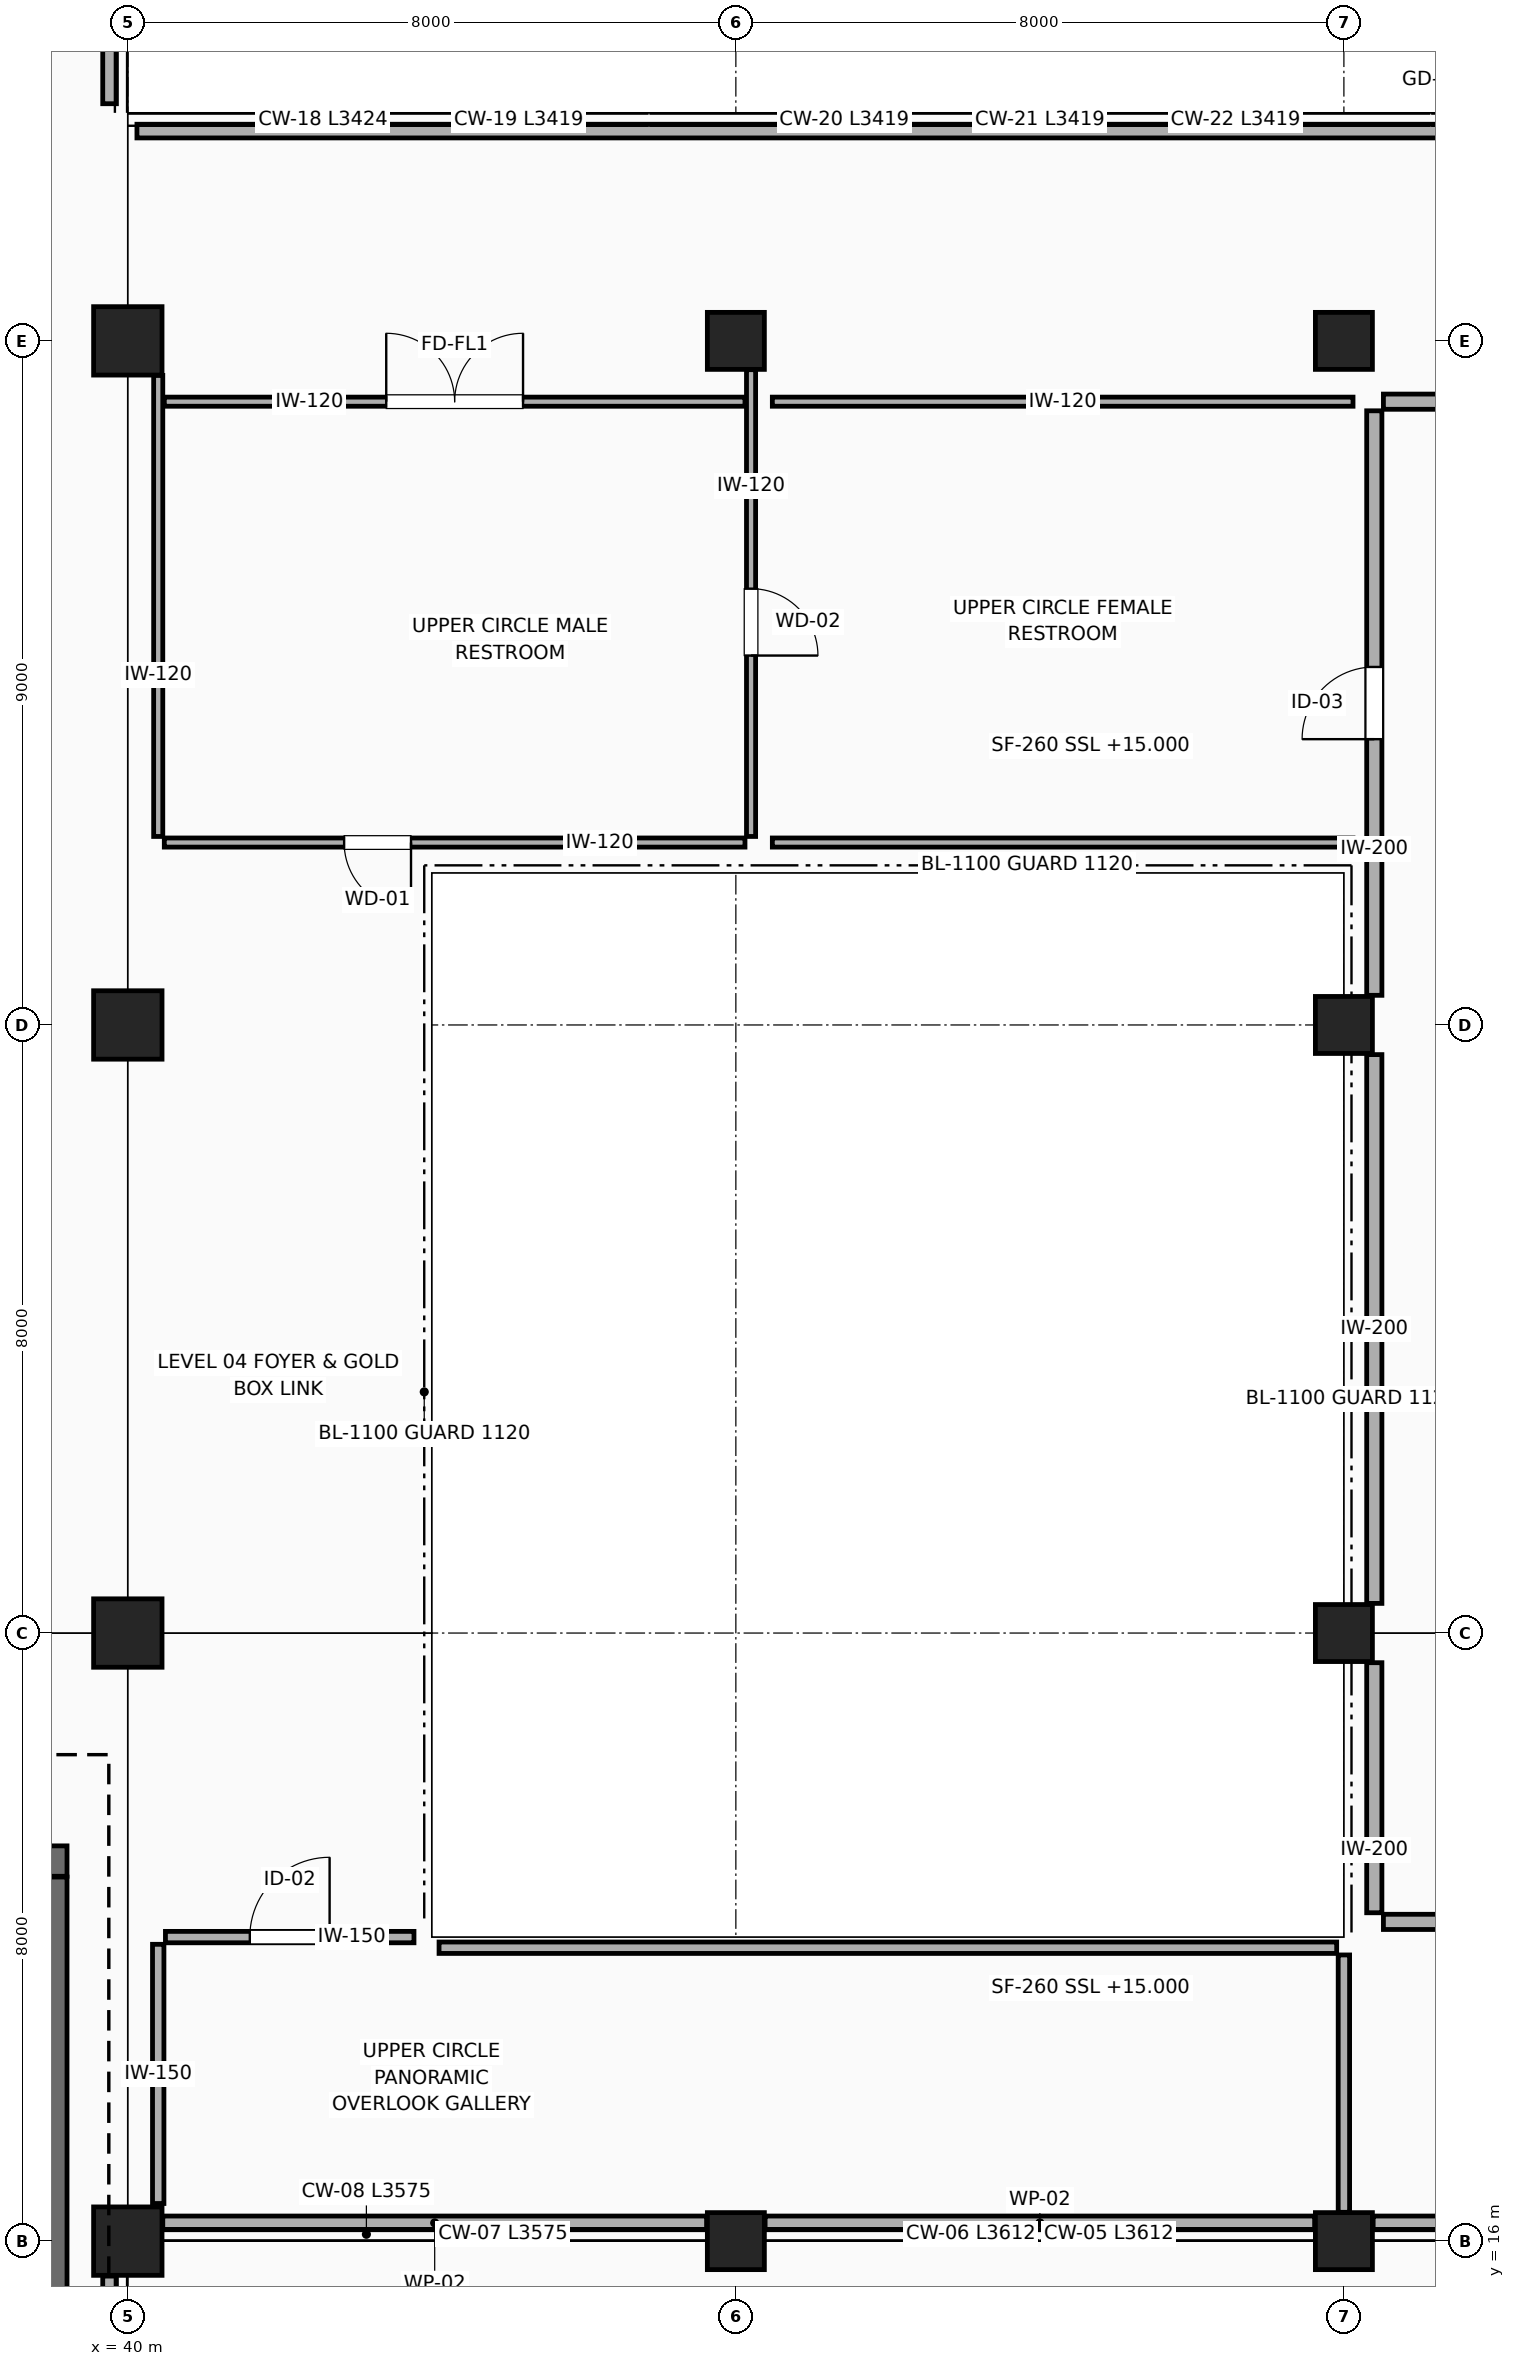
"""IFC4 building model, lengths in metres.
Left out: names, types, materials, properties, quantities, classifications, styles, units other than length and angle.
Written with IfcOpenShell. Run it as: python <this file> out.ifc"""

import sys

from ifc_helpers import new_model, si_unit, direction, frame, frame_2d, origin, origin_2d, place, context, subcontext, project, spatial, rectangle, extrude, element, fill, save


model = new_model("IFC4")
c1 = context("Model", 3, precision=1e-05, world=origin(), true_north=direction((0.0, 1.0)))
c2 = subcontext(c1, "Body", "Model", "MODEL_VIEW")
j1 = project(units=[si_unit("LENGTHUNIT", "METRE"), si_unit("PLANEANGLEUNIT", "RADIAN")], contexts=[c1])
p1 = place(None, origin())
s1 = spatial("IfcSite", under=j1, at=p1, CompositionType="ELEMENT")
p2 = place(p1, origin())
s2 = spatial("IfcBuilding", under=s1, at=p2, CompositionType="ELEMENT")
p3 = place(p2, frame((0.0, 0.0, 15.0)))
s3 = spatial("IfcBuildingStorey", under=s2, at=p3, CompositionType="ELEMENT", Elevation=15.0)
for number, where, z_axis, x_axis in (
    (1, (40.0, 16.0, 0.0), (0.0, 0.0, 1.0), (1.0, 0.0, 0.0)),
    (2, (40.0, 24.0, 0.0), (0.0, 0.0, 1.0), (1.0, 0.0, 0.0)),
    (3, (40.0, 32.0, 0.0), (0.0, 0.0, 1.0), (1.0, 0.0, 0.0)),
    (4, (40.0, 41.0, 0.0), (0.0, 0.0, 1.0), (1.0, 0.0, 0.0)),
):
    element("IfcColumn", number, at=place(p3, frame(where, z_axis=z_axis, x_axis=x_axis)), inside=s3, PredefinedType="COLUMN", context=c2, shape_type="SweptSolid", body=[
        extrude(rectangle(XDim=0.9, YDim=0.9, at=origin_2d()), origin(), (0.0, 0.0, 1.0), 4.8),
    ])
for number, where, z_axis, x_axis in (
    (5, (48.0, 16.0, 0.0), (0.0, 0.0, 1.0), (1.0, 0.0, 0.0)),
    (6, (48.0, 41.0, 0.0), (0.0, 0.0, 1.0), (1.0, 0.0, 0.0)),
    (7, (56.0, 16.0, 0.0), (0.0, 0.0, 1.0), (1.0, 0.0, 0.0)),
    (8, (56.0, 24.0, 0.0), (0.0, 0.0, 1.0), (1.0, 0.0, 0.0)),
    (9, (56.0, 32.0, 0.0), (0.0, 0.0, 1.0), (1.0, 0.0, 0.0)),
    (10, (56.0, 41.0, 0.0), (0.0, 0.0, 1.0), (1.0, 0.0, 0.0)),
):
    element("IfcColumn", number, at=place(p3, frame(where, z_axis=z_axis, x_axis=x_axis)), inside=s3, PredefinedType="COLUMN", context=c2, shape_type="SweptSolid", body=[
        extrude(rectangle(XDim=0.75, YDim=0.75, at=origin_2d()), origin(), (0.0, 0.0, 1.0), 4.76),
    ])
p4 = place(p3, frame((63.88, 16.24, 0.0), z_axis=(0.0, 0.0, 1.0), x_axis=(-1.0, 0.0, 0.0)))
e11 = element("IfcWall", 11, at=p4, inside=s3, PredefinedType="PARAPET", context=c2, shape_type="SweptSolid", body=[
    extrude(rectangle(XDim=7.495, YDim=0.18, at=frame_2d((3.748, 0.0))), origin(), (0.0, 0.0, 1.0), 0.88),
])
p5 = place(p3, frame((55.615, 16.24, 0.0), z_axis=(0.0, 0.0, 1.0), x_axis=(-1.0, 0.0, 0.0)))
e12 = element("IfcWall", 12, at=p5, inside=s3, PredefinedType="PARAPET", context=c2, shape_type="SweptSolid", body=[
    extrude(rectangle(XDim=7.23, YDim=0.18, at=frame_2d((3.615, 0.0))), origin(), (0.0, 0.0, 1.0), 0.88),
])
p6 = place(p3, frame((47.615, 16.24, 0.0), z_axis=(0.0, 0.0, 1.0), x_axis=(-1.0, 0.0, 0.0)))
e13 = element("IfcWall", 13, at=p6, inside=s3, PredefinedType="PARAPET", context=c2, shape_type="SweptSolid", body=[
    extrude(rectangle(XDim=7.155, YDim=0.18, at=frame_2d((3.578, 0.0))), origin(), (0.0, 0.0, 1.0), 0.88),
])
p7 = place(p3, frame((39.76, 15.54, 0.0), z_axis=(0.0, 0.0, 1.0), x_axis=(0.0, -1.0, 0.0)))
e14 = element("IfcWall", 14, at=p7, inside=s3, PredefinedType="PARAPET", context=c2, shape_type="SweptSolid", body=[
    extrude(rectangle(XDim=7.08, YDim=0.18, at=frame_2d((3.54, 0.0))), origin(), (0.0, 0.0, 1.0), 0.88),
])
p8 = place(p3, frame((39.76, 49.54, 0.0), z_axis=(0.0, 0.0, 1.0), x_axis=(0.0, -1.0, 0.0)))
e15 = element("IfcWall", 15, at=p8, inside=s3, PredefinedType="PARAPET", context=c2, shape_type="SweptSolid", body=[
    extrude(rectangle(XDim=5.42, YDim=0.18, at=frame_2d((2.71, 0.0))), origin(), (0.0, 0.0, 1.0), 0.88),
])
p9 = place(p3, frame((40.12, 43.76, 0.0), z_axis=(0.0, 0.0, 1.0), x_axis=(1.0, 0.0, 0.0)))
e16 = element("IfcWall", 16, at=p9, inside=s3, PredefinedType="PARAPET", context=c2, shape_type="SweptSolid", body=[
    extrude(rectangle(XDim=23.76, YDim=0.18, at=frame_2d((11.88, 0.0))), origin(), (0.0, 0.0, 1.0), 0.88),
])
p10 = place(p3, frame((39.2, 21.0, 0.0), z_axis=(0.0, 0.0, 1.0), x_axis=(-1.0, 0.0, 0.0)))
e17 = element("IfcWall", 17, at=p10, inside=s3, PredefinedType="SHEAR", context=c2, shape_type="SweptSolid", body=[
    extrude(rectangle(XDim=8.4, YDim=0.4, at=frame_2d((4.2, 0.0))), origin(), (0.0, 0.0, 1.0), 4.55),
])
p11 = place(p3, frame((39.0, 12.41, 0.0), z_axis=(0.0, 0.0, 1.0), x_axis=(0.0, 1.0, 0.0)))
e18 = element("IfcWall", 18, at=p11, inside=s3, PredefinedType="SHEAR", context=c2, shape_type="SweptSolid", body=[
    extrude(rectangle(XDim=8.38, YDim=0.4, at=frame_2d((4.19, 0.0))), origin(), (0.0, 0.0, 1.0), 4.55),
])
p12 = place(p3, frame((40.4, 16.495, 0.0), z_axis=(0.0, 0.0, 1.0), x_axis=(0.0, 1.0, 0.0)))
e19 = element("IfcWall", 19, at=p12, inside=s3, PredefinedType="PARTITIONING", context=c2, shape_type="SweptSolid", body=[
    extrude(rectangle(XDim=3.41, YDim=0.15, at=frame_2d((1.705, 0.0))), origin(), (0.0, 0.0, 1.0), 3.68),
])
p13 = place(p3, frame((40.495, 20.0, 0.0), z_axis=(0.0, 0.0, 1.0), x_axis=(1.0, 0.0, 0.0)))
e20 = element("IfcWall", 20, at=p13, inside=s3, PredefinedType="PARTITIONING", context=c2, shape_type="SweptSolid", body=[
    extrude(rectangle(XDim=3.27, YDim=0.15, at=frame_2d((1.635, 0.0))), origin(), (0.0, 0.0, 1.0), 4.57),
])
p14 = place(p13, frame((1.11, 0.0, 0.0)))
e21 = element("IfcOpeningElement", 21, at=p14, cuts=e20, PredefinedType="OPENING", context=c2, shape_type="SweptSolid", body=[
    extrude(rectangle(XDim=1.05, YDim=2.15, at=frame_2d((0.525, 1.075))), frame((0.0, 0.085, 0.0), z_axis=(0.0, -1.0, 0.0), x_axis=(1.0, 0.0, 0.0)), (0.0, 0.0, 1.0), 0.17),
])
p15 = place(p3, frame((44.095, 19.86, 0.0), z_axis=(0.0, 0.0, 1.0), x_axis=(1.0, 0.0, 0.0)))
e22 = element("IfcWall", 22, at=p15, inside=s3, PredefinedType="PARTITIONING", context=c2, shape_type="SweptSolid", body=[
    extrude(rectangle(XDim=11.81, YDim=0.15, at=frame_2d((5.905, 0.0))), origin(), (0.0, 0.0, 1.0), 4.57),
])
p16 = place(p3, frame((56.0, 19.765, 0.0), z_axis=(0.0, 0.0, 1.0), x_axis=(0.0, -1.0, 0.0)))
e23 = element("IfcWall", 23, at=p16, inside=s3, PredefinedType="PARTITIONING", context=c2, shape_type="SweptSolid", body=[
    extrude(rectangle(XDim=3.386, YDim=0.15, at=frame_2d((1.693, 0.0))), origin(), (0.0, 0.0, 1.0), 4.18),
])
p17 = place(p3, frame((56.52, 40.2, 0.0), z_axis=(0.0, 0.0, 1.0), x_axis=(1.0, 0.0, 0.0)))
e24 = element("IfcWall", 24, at=p17, inside=s3, PredefinedType="PARTITIONING", context=c2, shape_type="SweptSolid", body=[
    extrude(rectangle(XDim=1.81, YDim=0.2, at=frame_2d((0.905, 0.0))), origin(), (0.0, 0.0, 1.0), 4.57),
])
p18 = place(p3, frame((63.68, 20.2, 0.0), z_axis=(0.0, 0.0, 1.0), x_axis=(-1.0, 0.0, 0.0)))
e25 = element("IfcWall", 25, at=p18, inside=s3, PredefinedType="PARTITIONING", context=c2, shape_type="SweptSolid", body=[
    extrude(rectangle(XDim=7.16, YDim=0.2, at=frame_2d((3.58, 0.0))), origin(), (0.0, 0.0, 1.0), 4.57),
])
p19 = place(p3, frame((56.4, 20.32, 0.0), z_axis=(0.0, 0.0, 1.0), x_axis=(0.0, 1.0, 0.0)))
e26 = element("IfcWall", 26, at=p19, inside=s3, PredefinedType="PARTITIONING", context=c2, shape_type="SweptSolid", body=[
    extrude(rectangle(XDim=3.29, YDim=0.2, at=frame_2d((1.645, 0.0))), origin(), (0.0, 0.0, 1.0), 4.57),
])
p20 = place(p3, frame((56.4, 24.39, 0.0), z_axis=(0.0, 0.0, 1.0), x_axis=(0.0, 1.0, 0.0)))
e27 = element("IfcWall", 27, at=p20, inside=s3, PredefinedType="PARTITIONING", context=c2, shape_type="SweptSolid", body=[
    extrude(rectangle(XDim=7.22, YDim=0.2, at=frame_2d((3.61, 0.0))), origin(), (0.0, 0.0, 1.0), 4.57),
])
p21 = place(p3, frame((56.4, 32.39, 0.0), z_axis=(0.0, 0.0, 1.0), x_axis=(0.0, 1.0, 0.0)))
e28 = element("IfcWall", 28, at=p21, inside=s3, PredefinedType="PARTITIONING", context=c2, shape_type="SweptSolid", body=[
    extrude(rectangle(XDim=7.69, YDim=0.2, at=frame_2d((3.845, 0.0))), origin(), (0.0, 0.0, 1.0), 4.57),
])
p22 = place(p21, frame((3.37, 0.0, 0.0)))
e29 = element("IfcOpeningElement", 29, at=p22, cuts=e28, PredefinedType="OPENING", context=c2, shape_type="SweptSolid", body=[
    extrude(rectangle(XDim=0.95, YDim=2.15, at=frame_2d((0.475, 1.075))), frame((0.0, 0.11, 0.0), z_axis=(0.0, -1.0, 0.0), x_axis=(1.0, 0.0, 0.0)), (0.0, 0.0, 1.0), 0.22),
])
p23 = place(p3, frame((40.48, 40.2, 0.0), z_axis=(0.0, 0.0, 1.0), x_axis=(1.0, 0.0, 0.0)))
e30 = element("IfcWall", 30, at=p23, inside=s3, PredefinedType="PARTITIONING", context=c2, shape_type="SweptSolid", body=[
    extrude(rectangle(XDim=7.64, YDim=0.12, at=frame_2d((3.82, 0.0))), origin(), (0.0, 0.0, 1.0), 4.57),
])
p24 = place(p23, frame((2.92, 0.0, 0.0)))
e31 = element("IfcOpeningElement", 31, at=p24, cuts=e30, PredefinedType="OPENING", context=c2, shape_type="SweptSolid", body=[
    extrude(rectangle(XDim=1.8, YDim=2.15, at=frame_2d((0.9, 1.075))), frame((0.0, 0.07, 0.0), z_axis=(0.0, -1.0, 0.0), x_axis=(1.0, 0.0, 0.0)), (0.0, 0.0, 1.0), 0.14),
])
p25 = place(p3, frame((48.2, 40.621, 0.0), z_axis=(0.0, 0.0, 1.0), x_axis=(0.0, -1.0, 0.0)))
e32 = element("IfcWall", 32, at=p25, inside=s3, PredefinedType="PARTITIONING", context=c2, shape_type="SweptSolid", body=[
    extrude(rectangle(XDim=6.141, YDim=0.12, at=frame_2d((3.071, 0.0))), origin(), (0.0, 0.0, 1.0), 4.57),
])
p26 = place(p25, frame((2.881, 0.0, 0.0)))
e33 = element("IfcOpeningElement", 33, at=p26, cuts=e32, PredefinedType="OPENING", context=c2, shape_type="SweptSolid", body=[
    extrude(rectangle(XDim=0.88, YDim=2.1, at=frame_2d((0.44, 1.05))), frame((0.0, 0.07, 0.0), z_axis=(0.0, -1.0, 0.0), x_axis=(1.0, 0.0, 0.0)), (0.0, 0.0, 1.0), 0.14),
])
p27 = place(p3, frame((48.12, 34.4, 0.0), z_axis=(0.0, 0.0, 1.0), x_axis=(-1.0, 0.0, 0.0)))
e34 = element("IfcWall", 34, at=p27, inside=s3, PredefinedType="PARTITIONING", context=c2, shape_type="SweptSolid", body=[
    extrude(rectangle(XDim=7.64, YDim=0.12, at=frame_2d((3.82, 0.0))), origin(), (0.0, 0.0, 1.0), 4.57),
])
p28 = place(p27, frame((4.394, 0.0, 0.0)))
e35 = element("IfcOpeningElement", 35, at=p28, cuts=e34, PredefinedType="OPENING", context=c2, shape_type="SweptSolid", body=[
    extrude(rectangle(XDim=0.88, YDim=2.1, at=frame_2d((0.44, 1.05))), frame((0.0, 0.07, 0.0), z_axis=(0.0, -1.0, 0.0), x_axis=(1.0, 0.0, 0.0)), (0.0, 0.0, 1.0), 0.14),
])
p29 = place(p3, frame((40.4, 34.48, 0.0), z_axis=(0.0, 0.0, 1.0), x_axis=(0.0, 1.0, 0.0)))
e36 = element("IfcWall", 36, at=p29, inside=s3, PredefinedType="PARTITIONING", context=c2, shape_type="SweptSolid", body=[
    extrude(rectangle(XDim=6.066, YDim=0.12, at=frame_2d((3.033, 0.0))), origin(), (0.0, 0.0, 1.0), 4.57),
])
for number, where, z_axis, x_axis in (
    (37, (48.48, 40.2, 0.0), (0.0, 0.0, 1.0), (1.0, 0.0, 0.0)),
    (38, (56.12, 34.4, 0.0), (0.0, 0.0, 1.0), (-1.0, 0.0, 0.0)),
):
    element("IfcWall", number, at=place(p3, frame(where, z_axis=z_axis, x_axis=x_axis)), inside=s3, PredefinedType="PARTITIONING", context=c2, shape_type="SweptSolid", body=[
        extrude(rectangle(XDim=7.64, YDim=0.12, at=frame_2d((3.82, 0.0))), origin(), (0.0, 0.0, 1.0), 4.57),
    ])
p30 = place(p14, origin())
e39 = element("IfcDoor", 39, at=p30, inside=s3, OperationType="SINGLE_SWING_RIGHT", PredefinedType="DOOR", context=c2, shape_type="SweptSolid", body=[
    extrude(rectangle(XDim=1.05, YDim=2.15, at=frame_2d((0.525, 1.075))), frame((0.0, 0.025, 0.0), z_axis=(0.0, -1.0, 0.0), x_axis=(1.0, 0.0, 0.0)), (0.0, 0.0, 1.0), 0.05),
])
fill(e21, e39)
p31 = place(p22, origin())
e40 = element("IfcDoor", 40, at=p31, inside=s3, OperationType="SINGLE_SWING_LEFT", PredefinedType="DOOR", context=c2, shape_type="SweptSolid", body=[
    extrude(rectangle(XDim=0.95, YDim=2.15, at=frame_2d((0.475, 1.075))), frame((0.0, 0.025, 0.0), z_axis=(0.0, -1.0, 0.0), x_axis=(1.0, 0.0, 0.0)), (0.0, 0.0, 1.0), 0.05),
])
fill(e29, e40)
p32 = place(p28, origin())
e41 = element("IfcDoor", 41, at=p32, inside=s3, OperationType="SINGLE_SWING_LEFT", PredefinedType="DOOR", context=c2, shape_type="SweptSolid", body=[
    extrude(rectangle(XDim=0.88, YDim=2.1, at=frame_2d((0.44, 1.05))), frame((0.0, 0.025, 0.0), z_axis=(0.0, -1.0, 0.0), x_axis=(1.0, 0.0, 0.0)), (0.0, 0.0, 1.0), 0.05),
])
fill(e35, e41)
p33 = place(p26, origin())
e42 = element("IfcDoor", 42, at=p33, inside=s3, OperationType="SINGLE_SWING_RIGHT", PredefinedType="DOOR", context=c2, shape_type="SweptSolid", body=[
    extrude(rectangle(XDim=0.88, YDim=2.1, at=frame_2d((0.44, 1.05))), frame((0.0, 0.025, 0.0), z_axis=(0.0, -1.0, 0.0), x_axis=(1.0, 0.0, 0.0)), (0.0, 0.0, 1.0), 0.05),
])
fill(e33, e42)
p34 = place(p24, origin())
e43 = element("IfcDoor", 43, at=p34, inside=s3, OperationType="DOUBLE_DOOR_SINGLE_SWING", PredefinedType="DOOR", context=c2, shape_type="SweptSolid", body=[
    extrude(rectangle(XDim=1.8, YDim=2.15, at=frame_2d((0.9, 1.075))), frame((0.0, 0.025, 0.0), z_axis=(0.0, -1.0, 0.0), x_axis=(1.0, 0.0, 0.0)), (0.0, 0.0, 1.0), 0.05),
])
fill(e31, e43)
save(model, sys.argv[1])
